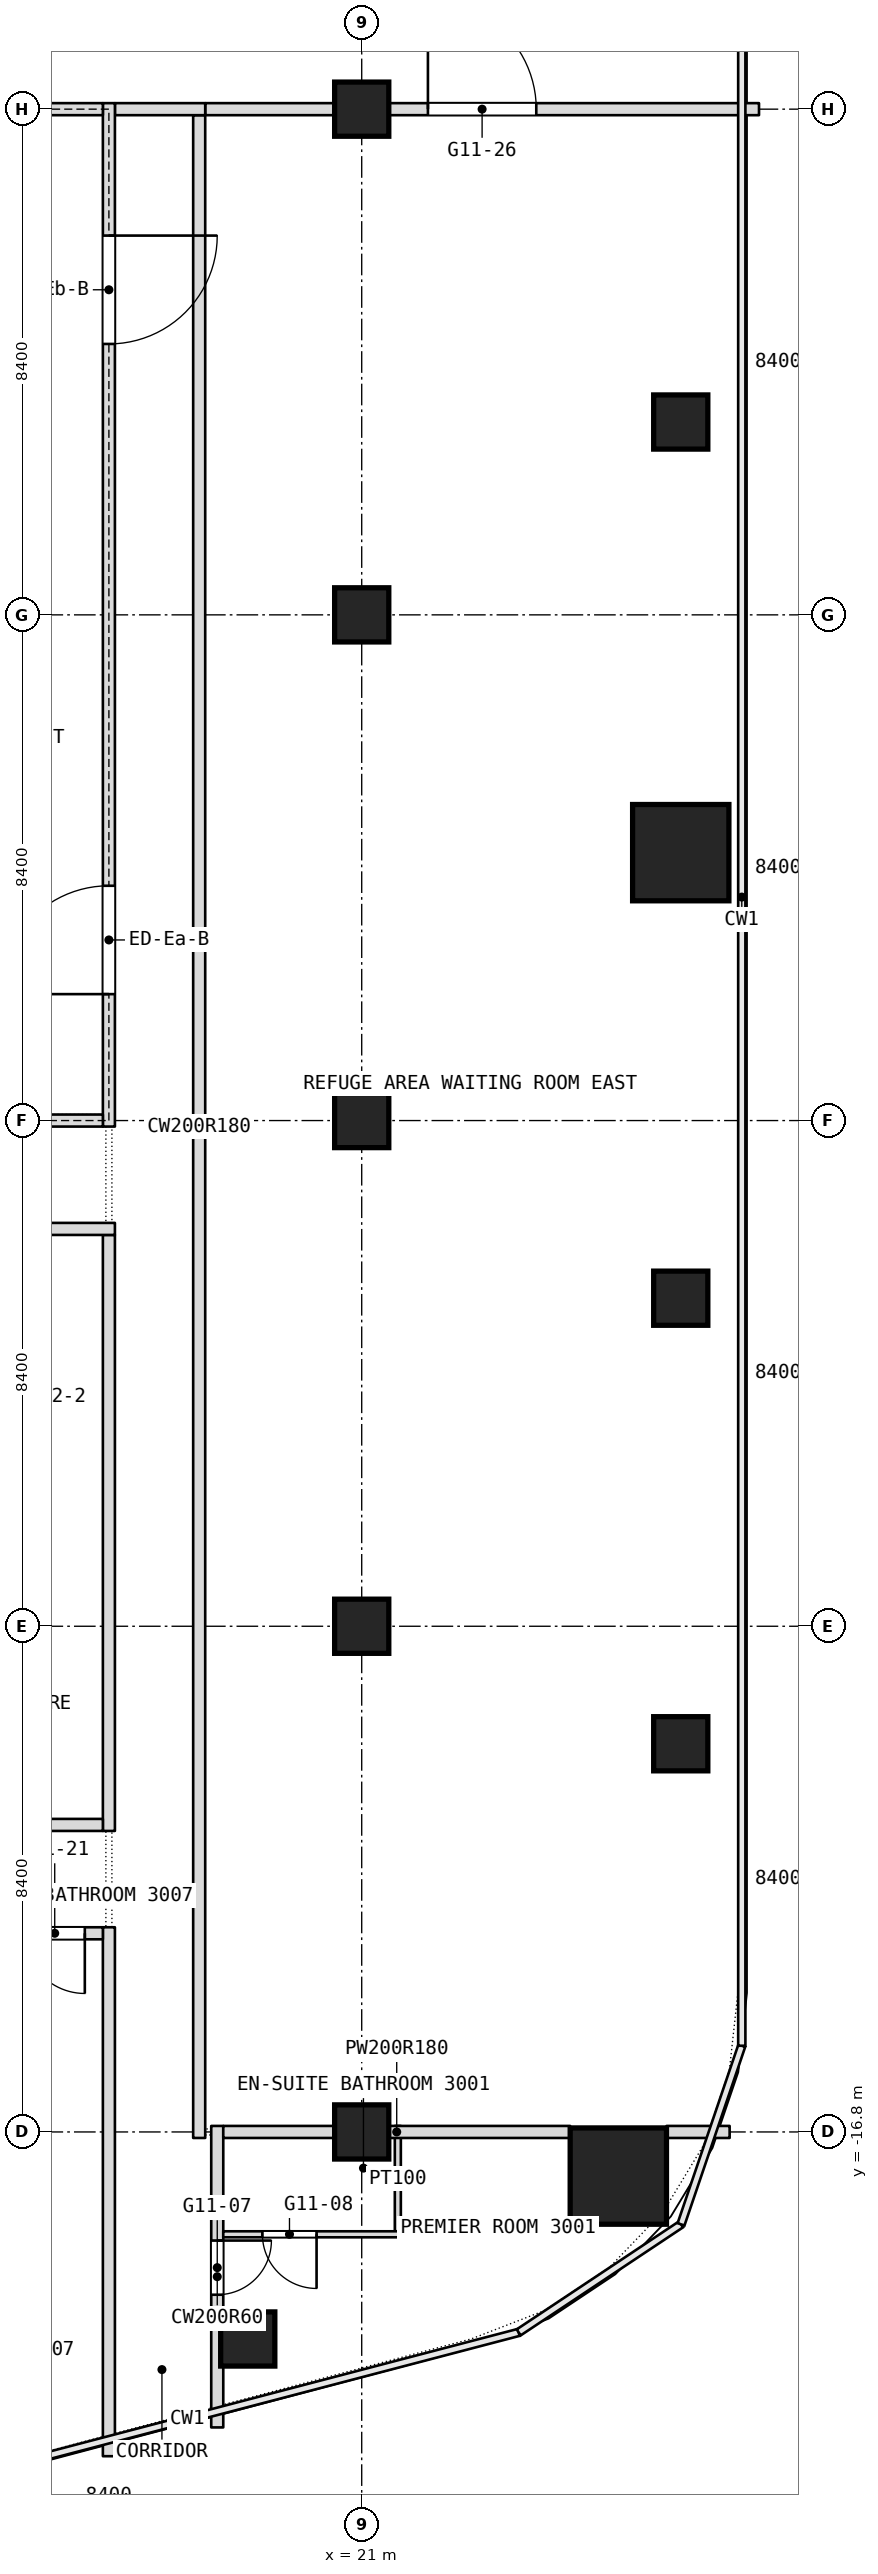
"""IFC4 building model, lengths in metres.
Left out: names, types, materials, properties, quantities, classifications, styles, units other than length and angle.
Written with IfcOpenShell. Run it as: python <this file> out.ifc"""

import sys

from ifc_helpers import new_model, si_unit, direction, frame, frame_2d, origin, origin_2d, place, context, subcontext, project, spatial, rectangle, extrude, element, fill, save


model = new_model("IFC4")
c1 = context("Model", 3, precision=1e-05, world=origin(), true_north=direction((0.0, 1.0)))
c2 = subcontext(c1, "Body", "Model", "MODEL_VIEW")
j1 = project(units=[si_unit("LENGTHUNIT", "METRE"), si_unit("PLANEANGLEUNIT", "RADIAN")], contexts=[c1])
p1 = place(None, origin())
s1 = spatial("IfcSite", under=j1, at=p1, CompositionType="ELEMENT")
p2 = place(p1, origin())
s2 = spatial("IfcBuilding", under=s1, at=p2, CompositionType="ELEMENT")
p3 = place(p2, frame((0.0, 0.0, 133.7)))
s3 = spatial("IfcBuildingStorey", under=s2, at=p3, CompositionType="ELEMENT", Elevation=133.7)
for number, where, z_axis, x_axis in (
    (1, (25.263, -17.533, 0.0), (0.0, 0.0, 1.0), (1.0, 0.0, 0.0)),
    (2, (26.3, 4.45, 0.0), (0.0, 0.0, 1.0), (1.0, 0.0, 0.0)),
):
    element("IfcColumn", number, at=place(p3, frame(where, z_axis=z_axis, x_axis=x_axis)), inside=s3, PredefinedType="COLUMN", context=c2, shape_type="SweptSolid", body=[
        extrude(rectangle(XDim=1.6, YDim=1.6, at=origin_2d()), origin(), (0.0, 0.0, 1.0), 3.6),
    ])
for number, where, z_axis, x_axis in (
    (3, (21.0, -16.8, 0.0), (0.0, 0.0, 1.0), (1.0, 0.0, 0.0)),
    (4, (21.0, -8.4, 0.0), (0.0, 0.0, 1.0), (1.0, 0.0, 0.0)),
    (5, (21.0, 0.0, 0.0), (0.0, 0.0, 1.0), (1.0, 0.0, 0.0)),
    (6, (21.0, 8.4, 0.0), (0.0, 0.0, 1.0), (1.0, 0.0, 0.0)),
    (7, (21.0, 16.8, 0.0), (0.0, 0.0, 1.0), (1.0, 0.0, 0.0)),
    (8, (26.3, 11.603, 0.0), (0.0, 0.0, 1.0), (1.0, 0.0, 0.0)),
    (9, (26.3, -2.951, 0.0), (0.0, 0.0, 1.0), (1.0, 0.0, 0.0)),
    (10, (26.3, -10.352, 0.0), (0.0, 0.0, 1.0), (1.0, 0.0, 0.0)),
    (11, (19.107, -20.239, 0.0), (0.0, 0.0, 1.0), (1.0, 0.0, 0.0)),
):
    element("IfcColumn", number, at=place(p3, frame(where, z_axis=z_axis, x_axis=x_axis)), inside=s3, PredefinedType="COLUMN", context=c2, shape_type="SweptSolid", body=[
        extrude(rectangle(XDim=0.9, YDim=0.9, at=origin_2d()), origin(), (0.0, 0.0, 1.0), 3.6),
    ])
p4 = place(p3, frame((21.6, -18.45, 0.0), z_axis=(0.0, 0.0, 1.0), x_axis=(0.0, 1.0, 0.0)))
e12 = element("IfcWall", 12, at=p4, inside=s3, PredefinedType="PARTITIONING", context=c2, shape_type="SweptSolid", body=[
    extrude(rectangle(XDim=1.75, YDim=0.1, at=frame_2d((0.875, 0.0))), origin(), (0.0, 0.0, 1.0), 3.34),
])
p5 = place(p3, frame((18.6, -21.708, 0.0), z_axis=(0.0, 0.0, 1.0), x_axis=(0.0, 1.0, 0.0)))
e13 = element("IfcWall", 13, at=p5, inside=s3, PredefinedType="PARTITIONING", context=c2, shape_type="SweptSolid", body=[
    extrude(rectangle(XDim=5.008, YDim=0.2, at=frame_2d((2.504, 0.0))), origin(), (0.0, 0.0, 1.0), 3.34),
])
p6 = place(p5, frame((2.204, 0.0, 0.0)))
e14 = element("IfcOpeningElement", 14, at=p6, cuts=e13, PredefinedType="OPENING", context=c2, shape_type="SweptSolid", body=[
    extrude(rectangle(XDim=0.9, YDim=2.1, at=frame_2d((0.45, 1.05))), frame((0.0, 0.1, 0.0), z_axis=(0.0, -1.0, 0.0), x_axis=(1.0, 0.0, 0.0)), (0.0, 0.0, 1.0), 0.2),
])
p7 = place(p3, frame((18.7, -18.5, 0.0), z_axis=(0.0, 0.0, 1.0), x_axis=(1.0, 0.0, 0.0)))
e15 = element("IfcWall", 15, at=p7, inside=s3, PredefinedType="PARTITIONING", context=c2, shape_type="SweptSolid", body=[
    extrude(rectangle(XDim=2.95, YDim=0.1, at=frame_2d((1.475, 0.0))), origin(), (0.0, 0.0, 1.0), 3.34),
])
p8 = place(p7, frame((0.65, 0.0, 0.0)))
e16 = element("IfcOpeningElement", 16, at=p8, cuts=e15, PredefinedType="OPENING", context=c2, shape_type="SweptSolid", body=[
    extrude(rectangle(XDim=0.9, YDim=2.1, at=frame_2d((0.45, 1.05))), frame((0.0, 0.05, 0.0), z_axis=(0.0, -1.0, 0.0), x_axis=(1.0, 0.0, 0.0)), (0.0, 0.0, 1.0), 0.1),
])
p9 = place(p3, frame((18.3, -16.9, 0.0), z_axis=(0.0, 0.0, 1.0), x_axis=(0.0, 1.0, 0.0)))
e17 = element("IfcWall", 17, at=p9, inside=s3, PredefinedType="PARTITIONING", context=c2, shape_type="SweptSolid", body=[
    extrude(rectangle(XDim=33.6, YDim=0.2, at=frame_2d((16.8, 0.0))), origin(), (0.0, 0.0, 1.0), 3.34),
])
p10 = place(p3, frame((16.8, -22.186, 0.0), z_axis=(0.0, 0.0, 1.0), x_axis=(0.0, 1.0, 0.0)))
e18 = element("IfcWall", 18, at=p10, inside=s3, PredefinedType="PARTITIONING", context=c2, shape_type="SweptSolid", body=[
    extrude(rectangle(XDim=8.786, YDim=0.2, at=frame_2d((4.393, 0.0))), origin(), (0.0, 0.0, 1.0), 3.34),
])
p11 = place(p3, frame((16.8, -11.8, 0.0), z_axis=(0.0, 0.0, 1.0), x_axis=(0.0, 1.0, 0.0)))
e19 = element("IfcWall", 19, at=p11, inside=s3, PredefinedType="PARTITIONING", context=c2, shape_type="SweptSolid", body=[
    extrude(rectangle(XDim=9.9, YDim=0.2, at=frame_2d((4.95, 0.0))), origin(), (0.0, 0.0, 1.0), 3.34),
])
p12 = place(p3, frame((18.7, -16.8, 0.0), z_axis=(0.0, 0.0, 1.0), x_axis=(1.0, 0.0, 0.0)))
e20 = element("IfcWall", 20, at=p12, inside=s3, PredefinedType="PARTITIONING", context=c2, shape_type="SweptSolid", body=[
    extrude(rectangle(XDim=5.763, YDim=0.2, at=frame_2d((2.881, 0.0))), origin(), (0.0, 0.0, 1.0), 2.89),
])
p13 = place(p3, frame((26.063, -16.8, 0.0), z_axis=(0.0, 0.0, 1.0), x_axis=(1.0, 0.0, 0.0)))
e21 = element("IfcWall", 21, at=p13, inside=s3, PredefinedType="PARTITIONING", context=c2, shape_type="SweptSolid", body=[
    extrude(rectangle(XDim=1.049, YDim=0.2, at=frame_2d((0.524, 0.0))), origin(), (0.0, 0.0, 1.0), 3.34),
])
p14 = place(p3, frame((-3.2, -13.5, 0.0), z_axis=(0.0, 0.0, 1.0), x_axis=(1.0, 0.0, 0.0)))
e22 = element("IfcWall", 22, at=p14, inside=s3, PredefinedType="PARTITIONING", context=c2, shape_type="SweptSolid", body=[
    extrude(rectangle(XDim=19.9, YDim=0.2, at=frame_2d((9.95, 0.0))), origin(), (0.0, 0.0, 1.0), 3.34),
])
p15 = place(p14, frame((2.7, 0.0, 0.0)))
e23 = element("IfcOpeningElement", 23, at=p15, cuts=e22, PredefinedType="OPENING", context=c2, shape_type="SweptSolid", body=[
    extrude(rectangle(XDim=1.1, YDim=2.1, at=frame_2d((0.55, 1.05))), frame((0.0, 0.1, 0.0), z_axis=(0.0, -1.0, 0.0), x_axis=(1.0, 0.0, 0.0)), (0.0, 0.0, 1.0), 0.2),
])
p16 = place(p14, frame((7.8, 0.0, 0.0)))
e24 = element("IfcOpeningElement", 24, at=p16, cuts=e22, PredefinedType="OPENING", context=c2, shape_type="SweptSolid", body=[
    extrude(rectangle(XDim=1.0, YDim=2.1, at=frame_2d((0.5, 1.05))), frame((0.0, 0.1, 0.0), z_axis=(0.0, -1.0, 0.0), x_axis=(1.0, 0.0, 0.0)), (0.0, 0.0, 1.0), 0.2),
])
p17 = place(p14, frame((14.4, 0.0, 0.0)))
e25 = element("IfcOpeningElement", 25, at=p17, cuts=e22, PredefinedType="OPENING", context=c2, shape_type="SweptSolid", body=[
    extrude(rectangle(XDim=1.0, YDim=2.1, at=frame_2d((0.5, 1.05))), frame((0.0, 0.1, 0.0), z_axis=(0.0, -1.0, 0.0), x_axis=(1.0, 0.0, 0.0)), (0.0, 0.0, 1.0), 0.2),
])
p18 = place(p14, frame((18.6, 0.0, 0.0)))
e26 = element("IfcOpeningElement", 26, at=p18, cuts=e22, PredefinedType="OPENING", context=c2, shape_type="SweptSolid", body=[
    extrude(rectangle(XDim=1.0, YDim=2.1, at=frame_2d((0.5, 1.05))), frame((0.0, 0.1, 0.0), z_axis=(0.0, -1.0, 0.0), x_axis=(1.0, 0.0, 0.0)), (0.0, 0.0, 1.0), 0.2),
])
p19 = place(p3, frame((-4.1, -11.7, 0.0), z_axis=(0.0, 0.0, 1.0), x_axis=(1.0, 0.0, 0.0)))
e27 = element("IfcWall", 27, at=p19, inside=s3, PredefinedType="PARTITIONING", context=c2, shape_type="SweptSolid", body=[
    extrude(rectangle(XDim=20.8, YDim=0.2, at=frame_2d((10.4, 0.0))), origin(), (0.0, 0.0, 1.0), 3.34),
])
p20 = place(p19, frame((14.1, 0.0, 0.0)))
e28 = element("IfcOpeningElement", 28, at=p20, cuts=e27, PredefinedType="OPENING", context=c2, shape_type="SweptSolid", body=[
    extrude(rectangle(XDim=1.0, YDim=2.1, at=frame_2d((0.5, 1.05))), frame((0.0, 0.1, 0.0), z_axis=(0.0, -1.0, 0.0), x_axis=(1.0, 0.0, 0.0)), (0.0, 0.0, 1.0), 0.2),
])
p21 = place(p3, frame((8.6, -1.8, 0.0), z_axis=(0.0, 0.0, 1.0), x_axis=(1.0, 0.0, 0.0)))
e29 = element("IfcWall", 29, at=p21, inside=s3, PredefinedType="PARTITIONING", context=c2, shape_type="SweptSolid", body=[
    extrude(rectangle(XDim=8.3, YDim=0.2, at=frame_2d((4.15, 0.0))), origin(), (0.0, 0.0, 1.0), 3.34),
])
p22 = place(p21, frame((5.6, 0.0, 0.0)))
e30 = element("IfcOpeningElement", 30, at=p22, cuts=e29, PredefinedType="OPENING", context=c2, shape_type="SweptSolid", body=[
    extrude(rectangle(XDim=1.0, YDim=2.1, at=frame_2d((0.5, 1.05))), frame((0.0, 0.1, 0.0), z_axis=(0.0, -1.0, 0.0), x_axis=(1.0, 0.0, 0.0)), (0.0, 0.0, 1.0), 0.2),
])
p23 = place(p3, frame((18.4, 16.8, 0.0), z_axis=(0.0, 0.0, 1.0), x_axis=(1.0, 0.0, 0.0)))
e31 = element("IfcWall", 31, at=p23, inside=s3, PredefinedType="PARTITIONING", context=c2, shape_type="SweptSolid", body=[
    extrude(rectangle(XDim=9.2, YDim=0.2, at=frame_2d((4.6, 0.0))), origin(), (0.0, 0.0, 1.0), 2.89),
])
p24 = place(p23, frame((3.7, 0.0, 0.0)))
e32 = element("IfcOpeningElement", 32, at=p24, cuts=e31, PredefinedType="OPENING", context=c2, shape_type="SweptSolid", body=[
    extrude(rectangle(XDim=1.8, YDim=2.1, at=frame_2d((0.9, 1.05))), frame((0.0, 0.1, 0.0), z_axis=(0.0, -1.0, 0.0), x_axis=(1.0, 0.0, 0.0)), (0.0, 0.0, 1.0), 0.2),
])
p25 = place(p3, frame((16.9, 16.8, 0.0), z_axis=(0.0, 0.0, 1.0), x_axis=(1.0, 0.0, 0.0)))
e33 = element("IfcWall", 33, at=p25, inside=s3, PredefinedType="PARTITIONING", context=c2, shape_type="SweptSolid", body=[
    extrude(rectangle(XDim=1.5, YDim=0.2, at=frame_2d((0.75, 0.0))), origin(), (0.0, 0.0, 1.0), 2.89),
])
p26 = place(p3, frame((16.8, -0.1, 0.0), z_axis=(0.0, 0.0, 1.0), x_axis=(0.0, 1.0, 0.0)))
e34 = element("IfcWall", 34, at=p26, inside=s3, PredefinedType="PARTITIONING", context=c2, shape_type="SweptSolid", body=[
    extrude(rectangle(XDim=17.0, YDim=0.2, at=frame_2d((8.5, 0.0))), origin(), (0.0, 0.0, 1.0), 3.34),
])
p27 = place(p26, frame((2.2, 0.0, 0.0)))
e35 = element("IfcOpeningElement", 35, at=p27, cuts=e34, PredefinedType="OPENING", context=c2, shape_type="SweptSolid", body=[
    extrude(rectangle(XDim=1.8, YDim=2.1, at=frame_2d((0.9, 1.05))), frame((0.0, 0.1, 0.0), z_axis=(0.0, -1.0, 0.0), x_axis=(1.0, 0.0, 0.0)), (0.0, 0.0, 1.0), 0.2),
])
p28 = place(p26, frame((13.0, 0.0, 0.0)))
e36 = element("IfcOpeningElement", 36, at=p28, cuts=e34, PredefinedType="OPENING", context=c2, shape_type="SweptSolid", body=[
    extrude(rectangle(XDim=1.8, YDim=2.1, at=frame_2d((0.9, 1.05))), frame((0.0, 0.1, 0.0), z_axis=(0.0, -1.0, 0.0), x_axis=(1.0, 0.0, 0.0)), (0.0, 0.0, 1.0), 0.2),
])
p29 = place(p3, frame((12.1, 0.0, 0.0), z_axis=(0.0, 0.0, 1.0), x_axis=(1.0, 0.0, 0.0)))
e37 = element("IfcWall", 37, at=p29, inside=s3, PredefinedType="PARTITIONING", context=c2, shape_type="SweptSolid", body=[
    extrude(rectangle(XDim=4.6, YDim=0.2, at=frame_2d((2.3, 0.0))), origin(), (0.0, 0.0, 1.0), 2.89),
])
p30 = place(p29, frame((0.3, 0.0, 0.0)))
e38 = element("IfcOpeningElement", 38, at=p30, cuts=e37, PredefinedType="OPENING", context=c2, shape_type="SweptSolid", body=[
    extrude(rectangle(XDim=1.2, YDim=2.1, at=frame_2d((0.6, 1.05))), frame((0.0, 0.1, 0.0), z_axis=(0.0, -1.0, 0.0), x_axis=(1.0, 0.0, 0.0)), (0.0, 0.0, 1.0), 0.2),
])
p31 = place(p3, frame((12.1, 16.8, 0.0), z_axis=(0.0, 0.0, 1.0), x_axis=(1.0, 0.0, 0.0)))
e39 = element("IfcWall", 39, at=p31, inside=s3, PredefinedType="PARTITIONING", context=c2, shape_type="SweptSolid", body=[
    extrude(rectangle(XDim=4.6, YDim=0.2, at=frame_2d((2.3, 0.0))), origin(), (0.0, 0.0, 1.0), 2.89),
])
p32 = place(p31, frame((0.3, 0.0, 0.0)))
e40 = element("IfcOpeningElement", 40, at=p32, cuts=e39, PredefinedType="OPENING", context=c2, shape_type="SweptSolid", body=[
    extrude(rectangle(XDim=1.2, YDim=2.1, at=frame_2d((0.6, 1.05))), frame((0.0, 0.1, 0.0), z_axis=(0.0, -1.0, 0.0), x_axis=(1.0, 0.0, 0.0)), (0.0, 0.0, 1.0), 0.2),
])
p33 = place(p6, origin())
e41 = element("IfcDoor", 41, at=p33, inside=s3, OperationType="SINGLE_SWING_LEFT", PredefinedType="DOOR", context=c2, shape_type="SweptSolid", body=[
    extrude(rectangle(XDim=0.9, YDim=2.1, at=frame_2d((0.45, 1.05))), frame((0.0, 0.025, 0.0), z_axis=(0.0, -1.0, 0.0), x_axis=(1.0, 0.0, 0.0)), (0.0, 0.0, 1.0), 0.05),
])
fill(e14, e41)
p34 = place(p8, origin())
e42 = element("IfcDoor", 42, at=p34, inside=s3, OperationType="SINGLE_SWING_LEFT", PredefinedType="DOOR", context=c2, shape_type="SweptSolid", body=[
    extrude(rectangle(XDim=0.9, YDim=2.1, at=frame_2d((0.45, 1.05))), frame((0.0, 0.025, 0.0), z_axis=(0.0, -1.0, 0.0), x_axis=(1.0, 0.0, 0.0)), (0.0, 0.0, 1.0), 0.05),
])
fill(e16, e42)
p35 = place(p18, origin())
e43 = element("IfcDoor", 43, at=p35, inside=s3, OperationType="SINGLE_SWING_LEFT", PredefinedType="DOOR", context=c2, shape_type="SweptSolid", body=[
    extrude(rectangle(XDim=1.0, YDim=2.1, at=frame_2d((0.5, 1.05))), frame((0.0, 0.025, 0.0), z_axis=(0.0, -1.0, 0.0), x_axis=(1.0, 0.0, 0.0)), (0.0, 0.0, 1.0), 0.05),
])
fill(e26, e43)
p36 = place(p24, origin())
e44 = element("IfcDoor", 44, at=p36, inside=s3, OperationType="DOUBLE_DOOR_SINGLE_SWING", PredefinedType="DOOR", context=c2, shape_type="SweptSolid", body=[
    extrude(rectangle(XDim=1.8, YDim=2.1, at=frame_2d((0.9, 1.05))), frame((0.0, 0.025, 0.0), z_axis=(0.0, -1.0, 0.0), x_axis=(1.0, 0.0, 0.0)), (0.0, 0.0, 1.0), 0.05),
])
fill(e32, e44)
p37 = place(p27, origin())
e45 = element("IfcDoor", 45, at=p37, inside=s3, OperationType="DOUBLE_DOOR_SINGLE_SWING", PredefinedType="DOOR", context=c2, shape_type="SweptSolid", body=[
    extrude(rectangle(XDim=1.8, YDim=2.1, at=frame_2d((0.9, 1.05))), frame((0.0, 0.025, 0.0), z_axis=(0.0, -1.0, 0.0), x_axis=(1.0, 0.0, 0.0)), (0.0, 0.0, 1.0), 0.05),
])
fill(e35, e45)
p38 = place(p28, origin())
e46 = element("IfcDoor", 46, at=p38, inside=s3, OperationType="DOUBLE_DOOR_SINGLE_SWING", PredefinedType="DOOR", context=c2, shape_type="SweptSolid", body=[
    extrude(rectangle(XDim=1.8, YDim=2.1, at=frame_2d((0.9, 1.05))), frame((0.0, 0.025, 0.0), z_axis=(0.0, -1.0, 0.0), x_axis=(1.0, 0.0, 0.0)), (0.0, 0.0, 1.0), 0.05),
])
fill(e36, e46)
save(model, sys.argv[1])
